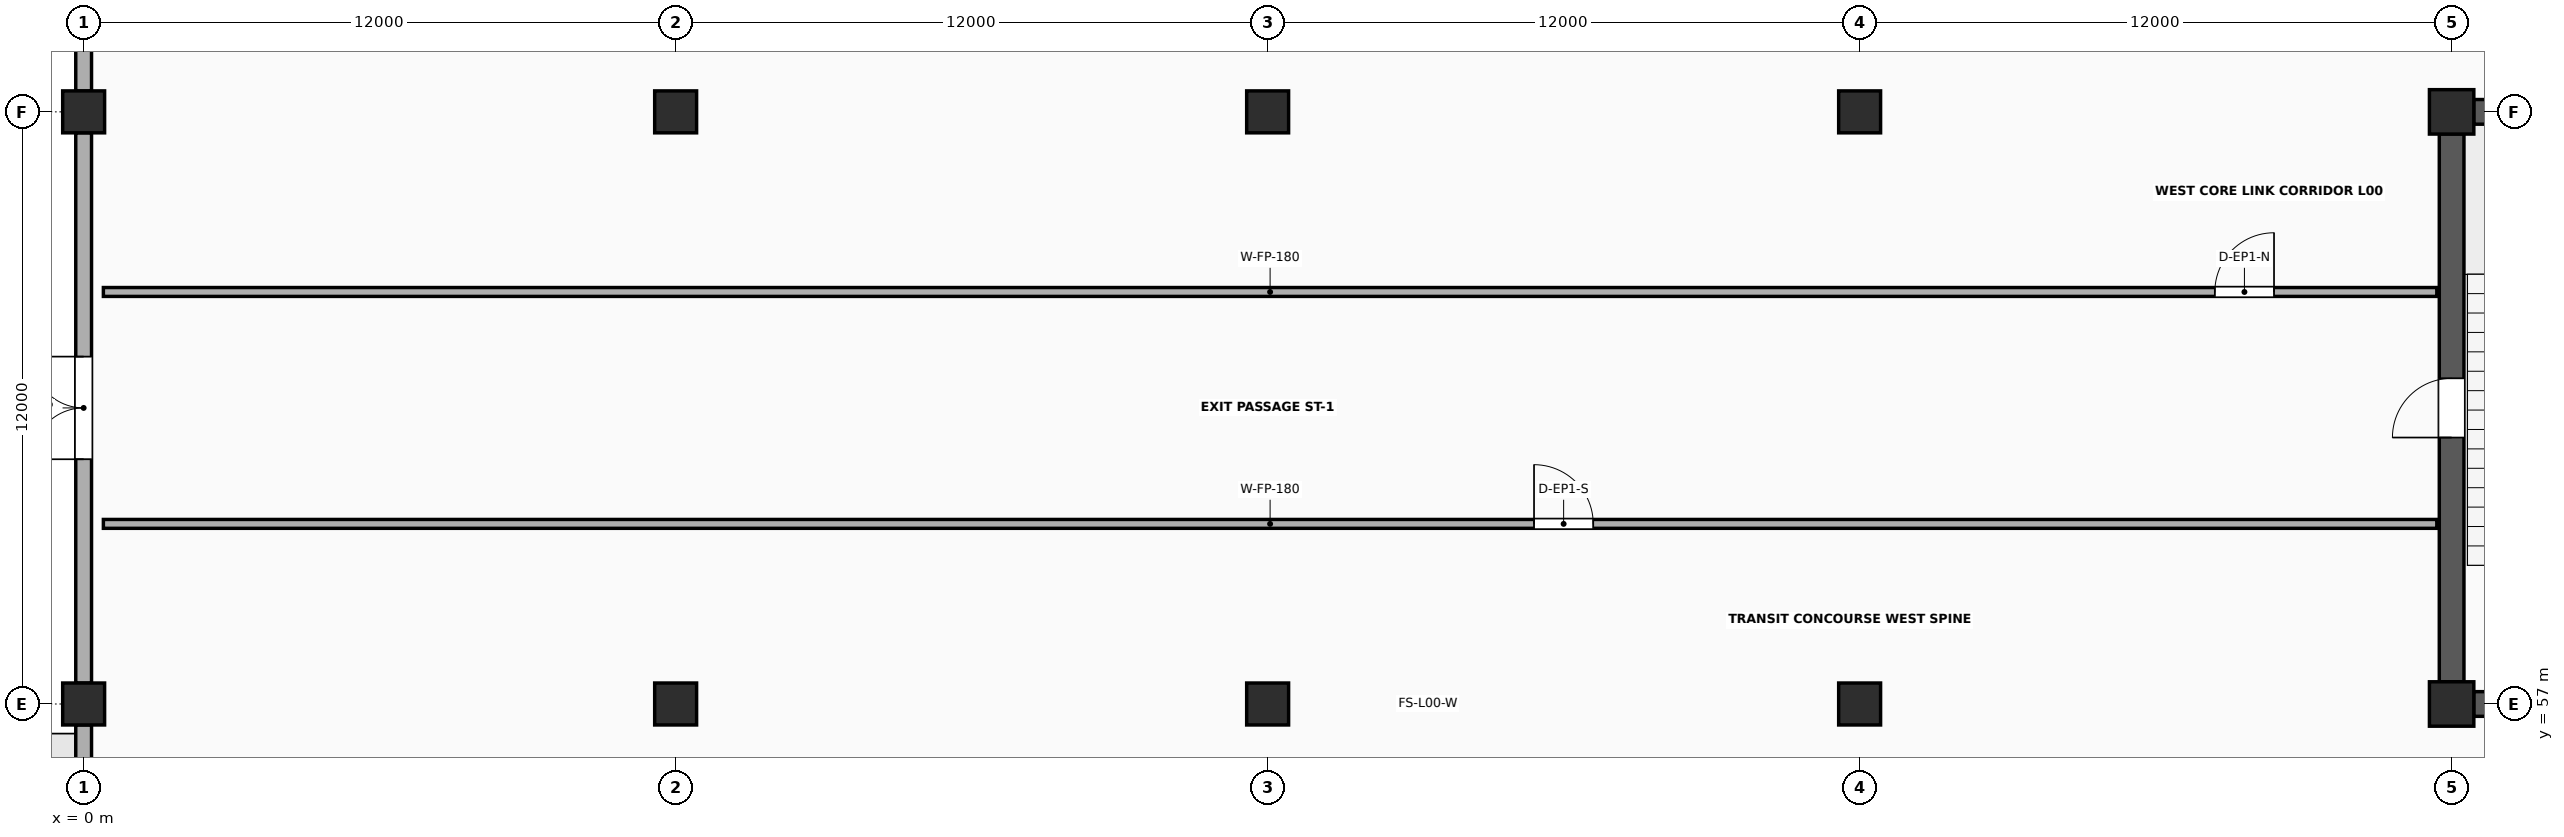
"""IFC4 building model, lengths in metres.
Left out: names, types, materials, properties, quantities, classifications, styles, units other than length and angle.
Written with IfcOpenShell. Run it as: python <this file> out.ifc"""

import sys

from ifc_helpers import new_model, si_unit, direction, frame, frame_2d, origin, origin_2d, place, context, subcontext, project, spatial, rectangle, extrude, element, fill, save


model = new_model("IFC4")
c1 = context("Model", 3, precision=1e-05, world=origin(), true_north=direction((0.0, 1.0)))
c2 = subcontext(c1, "Body", "Model", "MODEL_VIEW")
j1 = project(units=[si_unit("LENGTHUNIT", "METRE"), si_unit("PLANEANGLEUNIT", "RADIAN")], contexts=[c1])
p1 = place(None, origin())
s1 = spatial("IfcSite", under=j1, at=p1, CompositionType="ELEMENT")
p2 = place(p1, origin())
s2 = spatial("IfcBuilding", under=s1, at=p2, CompositionType="ELEMENT")
p3 = place(p2, origin())
s3 = spatial("IfcBuildingStorey", under=s2, at=p3, CompositionType="ELEMENT", Elevation=0.0)
for number, where, z_axis, x_axis in (
    (1, (0.0, 57.0, 0.0), (0.0, 0.0, 1.0), (1.0, 0.0, 0.0)),
    (2, (0.0, 69.0, 0.0), (0.0, 0.0, 1.0), (1.0, 0.0, 0.0)),
    (3, (12.0, 57.0, 0.0), (0.0, 0.0, 1.0), (1.0, 0.0, 0.0)),
    (4, (12.0, 69.0, 0.0), (0.0, 0.0, 1.0), (1.0, 0.0, 0.0)),
    (5, (24.0, 57.0, 0.0), (0.0, 0.0, 1.0), (1.0, 0.0, 0.0)),
    (6, (24.0, 69.0, 0.0), (0.0, 0.0, 1.0), (1.0, 0.0, 0.0)),
    (7, (36.0, 57.0, 0.0), (0.0, 0.0, 1.0), (1.0, 0.0, 0.0)),
    (8, (36.0, 69.0, 0.0), (0.0, 0.0, 1.0), (1.0, 0.0, 0.0)),
):
    element("IfcColumn", number, at=place(p3, frame(where, z_axis=z_axis, x_axis=x_axis)), inside=s3, PredefinedType="COLUMN", context=c2, shape_type="SweptSolid", body=[
        extrude(rectangle(XDim=0.85, YDim=0.85, at=origin_2d()), origin(), (0.0, 0.0, 1.0), 5.4),
    ])
for number, where, z_axis, x_axis in (
    (9, (48.0, 57.0, 0.0), (0.0, 0.0, 1.0), (1.0, 0.0, 0.0)),
    (10, (48.0, 69.0, 0.0), (0.0, 0.0, 1.0), (1.0, 0.0, 0.0)),
):
    element("IfcColumn", number, at=place(p3, frame(where, z_axis=z_axis, x_axis=x_axis)), inside=s3, PredefinedType="COLUMN", context=c2, shape_type="SweptSolid", body=[
        extrude(rectangle(XDim=0.9, YDim=0.9, at=origin_2d()), origin(), (0.0, 0.0, 1.0), 5.4),
    ])
p4 = place(p3, frame((48.447, 57.0, 0.0), z_axis=(0.0, 0.0, 1.0), x_axis=(1.0, 0.0, 0.0)))
e11 = element("IfcWall", 11, at=p4, inside=s3, PredefinedType="SHEAR", context=c2, shape_type="SweptSolid", body=[
    extrude(rectangle(XDim=11.106, YDim=0.5, at=frame_2d((5.553, 0.0))), origin(), (0.0, 0.0, 1.0), 5.203),
])
p5 = place(p4, frame((4.753, 0.0, 0.0)))
e12 = element("IfcOpeningElement", 12, at=p5, cuts=e11, PredefinedType="OPENING", context=c2, shape_type="SweptSolid", body=[
    extrude(rectangle(XDim=1.2, YDim=2.2, at=frame_2d((0.6, 1.1))), frame((0.0, 0.265, 0.0), z_axis=(0.0, -1.0, 0.0), x_axis=(1.0, 0.0, 0.0)), (0.0, 0.0, 1.0), 0.53),
])
p6 = place(p4, frame((8.453, 0.0, 0.0)))
e13 = element("IfcOpeningElement", 13, at=p6, cuts=e11, PredefinedType="OPENING", context=c2, shape_type="SweptSolid", body=[
    extrude(rectangle(XDim=1.5, YDim=2.25, at=frame_2d((0.75, 1.125))), frame((0.0, 0.265, 0.0), z_axis=(0.0, -1.0, 0.0), x_axis=(1.0, 0.0, 0.0)), (0.0, 0.0, 1.0), 0.53),
])
p7 = place(p3, frame((48.447, 69.0, 0.0), z_axis=(0.0, 0.0, 1.0), x_axis=(1.0, 0.0, 0.0)))
e14 = element("IfcWall", 14, at=p7, inside=s3, PredefinedType="SHEAR", context=c2, shape_type="SweptSolid", body=[
    extrude(rectangle(XDim=11.106, YDim=0.5, at=frame_2d((5.553, 0.0))), origin(), (0.0, 0.0, 1.0), 5.203),
])
p8 = place(p3, frame((48.0, 57.447, 0.0), z_axis=(0.0, 0.0, 1.0), x_axis=(0.0, 1.0, 0.0)))
e15 = element("IfcWall", 15, at=p8, inside=s3, PredefinedType="SHEAR", context=c2, shape_type="SweptSolid", body=[
    extrude(rectangle(XDim=11.106, YDim=0.5, at=frame_2d((5.553, 0.0))), origin(), (0.0, 0.0, 1.0), 5.203),
])
p9 = place(p8, frame((4.953, 0.0, 0.0)))
e16 = element("IfcOpeningElement", 16, at=p9, cuts=e15, PredefinedType="OPENING", context=c2, shape_type="SweptSolid", body=[
    extrude(rectangle(XDim=1.2, YDim=2.2, at=frame_2d((0.6, 1.1))), frame((0.0, 0.265, 0.0), z_axis=(0.0, -1.0, 0.0), x_axis=(1.0, 0.0, 0.0)), (0.0, 0.0, 1.0), 0.53),
])
p10 = place(p3, frame((0.0, 45.423, 0.0), z_axis=(0.0, 0.0, 1.0), x_axis=(0.0, 1.0, 0.0)))
e17 = element("IfcWall", 17, at=p10, inside=s3, PredefinedType="SOLIDWALL", context=c2, shape_type="SweptSolid", body=[
    extrude(rectangle(XDim=11.154, YDim=0.32, at=frame_2d((5.577, 0.0))), origin(), (0.0, 0.0, 1.0), 3.85),
])
p11 = place(p10, frame((2.577, 0.0, 0.0)))
e18 = element("IfcOpeningElement", 18, at=p11, cuts=e17, PredefinedType="OPENING", context=c2, shape_type="SweptSolid", body=[
    extrude(rectangle(XDim=6.0, YDim=3.2, at=frame_2d((3.0, 1.6))), frame((0.0, 0.175, 0.0), z_axis=(0.0, -1.0, 0.0), x_axis=(1.0, 0.0, 0.0)), (0.0, 0.0, 1.0), 0.35),
])
p12 = place(p3, frame((0.0, 57.423, 0.0), z_axis=(0.0, 0.0, 1.0), x_axis=(0.0, 1.0, 0.0)))
e19 = element("IfcWall", 19, at=p12, inside=s3, PredefinedType="SOLIDWALL", context=c2, shape_type="SweptSolid", body=[
    extrude(rectangle(XDim=11.154, YDim=0.32, at=frame_2d((5.577, 0.0))), origin(), (0.0, 0.0, 1.0), 3.85),
])
p13 = place(p12, frame((4.537, 0.0, 0.0)))
e20 = element("IfcOpeningElement", 20, at=p13, cuts=e19, PredefinedType="OPENING", context=c2, shape_type="SweptSolid", body=[
    extrude(rectangle(XDim=2.08, YDim=2.44, at=frame_2d((1.04, 1.22))), frame((0.0, 0.175, 0.0), z_axis=(0.0, -1.0, 0.0), x_axis=(1.0, 0.0, 0.0)), (0.0, 0.0, 1.0), 0.35),
])
p14 = place(p3, frame((0.0, 69.423, 0.0), z_axis=(0.0, 0.0, 1.0), x_axis=(0.0, 1.0, 0.0)))
e21 = element("IfcWall", 21, at=p14, inside=s3, PredefinedType="SOLIDWALL", context=c2, shape_type="SweptSolid", body=[
    extrude(rectangle(XDim=8.104, YDim=0.32, at=frame_2d((4.052, 0.0))), origin(), (0.0, 0.0, 1.0), 3.85),
])
p15 = place(p14, frame((2.952, 0.0, 0.55)))
e22 = element("IfcOpeningElement", 22, at=p15, cuts=e21, PredefinedType="OPENING", context=c2, shape_type="SweptSolid", body=[
    extrude(rectangle(XDim=2.2, YDim=1.25, at=frame_2d((1.1, 0.625))), frame((0.0, 0.175, 0.0), z_axis=(0.0, -1.0, 0.0), x_axis=(1.0, 0.0, 0.0)), (0.0, 0.0, 1.0), 0.35),
])
p16 = place(p3, frame((0.4, 60.65, 0.0), z_axis=(0.0, 0.0, 1.0), x_axis=(1.0, 0.0, 0.0)))
e23 = element("IfcWall", 23, at=p16, inside=s3, PredefinedType="SOLIDWALL", context=c2, shape_type="SweptSolid", body=[
    extrude(rectangle(XDim=47.3, YDim=0.18, at=frame_2d((23.65, 0.0))), origin(), (0.0, 0.0, 1.0), 2.6),
])
p17 = place(p16, frame((29.0, 0.0, 0.0)))
e24 = element("IfcOpeningElement", 24, at=p17, cuts=e23, PredefinedType="OPENING", context=c2, shape_type="SweptSolid", body=[
    extrude(rectangle(XDim=1.2, YDim=2.2, at=frame_2d((0.6, 1.1))), frame((0.0, 0.105, 0.0), z_axis=(0.0, -1.0, 0.0), x_axis=(1.0, 0.0, 0.0)), (0.0, 0.0, 1.0), 0.21),
])
p18 = place(p3, frame((0.4, 65.35, 0.0), z_axis=(0.0, 0.0, 1.0), x_axis=(1.0, 0.0, 0.0)))
e25 = element("IfcWall", 25, at=p18, inside=s3, PredefinedType="SOLIDWALL", context=c2, shape_type="SweptSolid", body=[
    extrude(rectangle(XDim=47.3, YDim=0.18, at=frame_2d((23.65, 0.0))), origin(), (0.0, 0.0, 1.0), 2.6),
])
p19 = place(p18, frame((42.8, 0.0, 0.0)))
e26 = element("IfcOpeningElement", 26, at=p19, cuts=e25, PredefinedType="OPENING", context=c2, shape_type="SweptSolid", body=[
    extrude(rectangle(XDim=1.2, YDim=2.2, at=frame_2d((0.6, 1.1))), frame((0.0, 0.105, 0.0), z_axis=(0.0, -1.0, 0.0), x_axis=(1.0, 0.0, 0.0)), (0.0, 0.0, 1.0), 0.21),
])
p20 = place(p13, origin())
e27 = element("IfcDoor", 27, at=p20, inside=s3, OperationType="DOUBLE_DOOR_SINGLE_SWING", PredefinedType="DOOR", context=c2, shape_type="SweptSolid", body=[
    extrude(rectangle(XDim=2.08, YDim=2.44, at=frame_2d((1.04, 1.22))), frame((0.0, 0.025, 0.0), z_axis=(0.0, -1.0, 0.0), x_axis=(1.0, 0.0, 0.0)), (0.0, 0.0, 1.0), 0.05),
])
fill(e20, e27)
p21 = place(p9, origin())
e28 = element("IfcDoor", 28, at=p21, inside=s3, OperationType="SINGLE_SWING_LEFT", PredefinedType="DOOR", context=c2, shape_type="SweptSolid", body=[
    extrude(rectangle(XDim=1.2, YDim=2.2, at=frame_2d((0.6, 1.1))), frame((0.0, 0.025, 0.0), z_axis=(0.0, -1.0, 0.0), x_axis=(1.0, 0.0, 0.0)), (0.0, 0.0, 1.0), 0.05),
])
fill(e16, e28)
p22 = place(p17, origin())
e29 = element("IfcDoor", 29, at=p22, inside=s3, OperationType="SINGLE_SWING_LEFT", PredefinedType="DOOR", context=c2, shape_type="SweptSolid", body=[
    extrude(rectangle(XDim=1.2, YDim=2.2, at=frame_2d((0.6, 1.1))), frame((0.0, 0.025, 0.0), z_axis=(0.0, -1.0, 0.0), x_axis=(1.0, 0.0, 0.0)), (0.0, 0.0, 1.0), 0.05),
])
fill(e24, e29)
p23 = place(p19, frame((1.2, 0.0, 0.0), z_axis=(0.0, 0.0, 1.0), x_axis=(-1.0, 0.0, 0.0)))
e30 = element("IfcDoor", 30, at=p23, inside=s3, OperationType="SINGLE_SWING_RIGHT", PredefinedType="DOOR", context=c2, shape_type="SweptSolid", body=[
    extrude(rectangle(XDim=1.2, YDim=2.2, at=frame_2d((0.6, 1.1))), frame((0.0, 0.025, 0.0), z_axis=(0.0, -1.0, 0.0), x_axis=(1.0, 0.0, 0.0)), (0.0, 0.0, 1.0), 0.05),
])
fill(e26, e30)
save(model, sys.argv[1])
